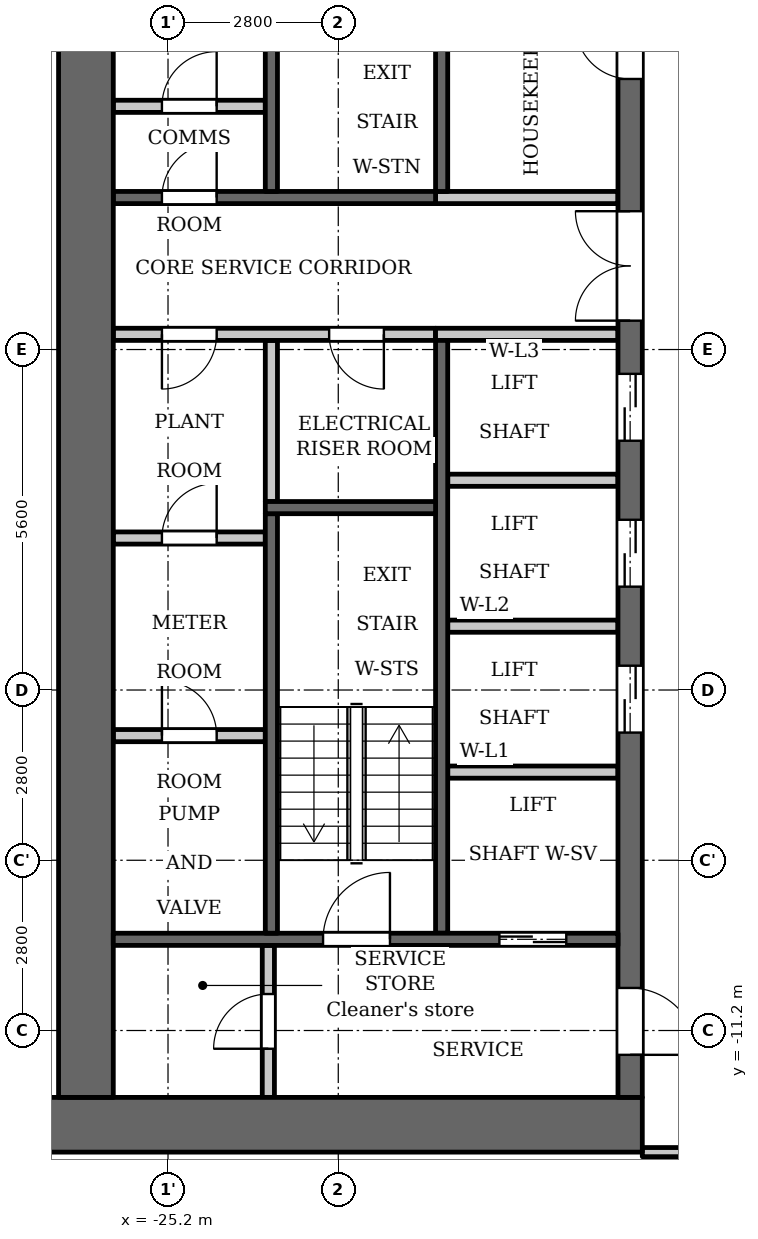
"""IFC4 building model, lengths in metres.
Left out: names, types, materials, properties, quantities, classifications, styles, units other than length and angle.
Written with IfcOpenShell. Run it as: python <this file> out.ifc"""

import sys

from ifc_helpers import new_model, si_unit, direction, frame, frame_2d, origin, place, context, subcontext, project, spatial, rectangle, extrude, element, fill, save


model = new_model("IFC4")
c1 = context("Model", 3, precision=1e-05, world=origin(), true_north=direction((0.0, 1.0)))
c2 = subcontext(c1, "Body", "Model", "MODEL_VIEW")
j1 = project(units=[si_unit("LENGTHUNIT", "METRE"), si_unit("PLANEANGLEUNIT", "RADIAN")], contexts=[c1])
p1 = place(None, origin())
s1 = spatial("IfcSite", under=j1, at=p1, CompositionType="ELEMENT")
p2 = place(p1, origin())
s2 = spatial("IfcBuilding", under=s1, at=p2, CompositionType="ELEMENT")
p3 = place(p2, frame((0.0, 0.0, 111.3)))
s3 = spatial("IfcBuildingStorey", under=s2, at=p3, CompositionType="ELEMENT", Elevation=111.3)
p4 = place(p3, frame((-23.5, -2.5, 0.0), z_axis=(0.0, 0.0, 1.0), x_axis=(0.0, 1.0, 0.0)))
e1 = element("IfcWall", 1, at=p4, inside=s3, PredefinedType="PARTITIONING", context=c2, shape_type="SweptSolid", body=[
    extrude(rectangle(XDim=2.65, YDim=0.2, at=frame_2d((1.325, 0.0))), origin(), (0.0, 0.0, 1.0), 3.2),
])
p5 = place(p3, frame((-20.7, 2.6, 0.0), z_axis=(0.0, 0.0, 1.0), x_axis=(0.0, 1.0, 0.0)))
e2 = element("IfcWall", 2, at=p5, inside=s3, PredefinedType="SHEAR", context=c2, shape_type="SweptSolid", body=[
    extrude(rectangle(XDim=7.0, YDim=0.2, at=frame_2d((3.5, 0.0))), origin(), (0.0, 0.0, 1.0), 3.2),
])
p6 = place(p3, frame((-20.7, -9.6, 0.0), z_axis=(0.0, 0.0, 1.0), x_axis=(0.0, 1.0, 0.0)))
e3 = element("IfcWall", 3, at=p6, inside=s3, PredefinedType="SHEAR", context=c2, shape_type="SweptSolid", body=[
    extrude(rectangle(XDim=9.75, YDim=0.2, at=frame_2d((4.875, 0.0))), origin(), (0.0, 0.0, 1.0), 3.2),
])
p7 = place(p3, frame((-20.8, 2.5, 0.0), z_axis=(0.0, 0.0, 1.0), x_axis=(-1.0, 0.0, 0.0)))
e4 = element("IfcWall", 4, at=p7, inside=s3, PredefinedType="SHEAR", context=c2, shape_type="SweptSolid", body=[
    extrude(rectangle(XDim=5.3, YDim=0.2, at=frame_2d((2.65, 0.0))), origin(), (0.0, 0.0, 1.0), 3.2),
])
p8 = place(p7, frame((3.6, 0.0, 0.0)))
e5 = element("IfcOpeningElement", 5, at=p8, cuts=e4, PredefinedType="OPENING", context=c2, shape_type="SweptSolid", body=[
    extrude(rectangle(XDim=0.9, YDim=2.1, at=frame_2d((0.45, 1.05))), frame((0.0, 0.11, 0.0), z_axis=(0.0, -1.0, 0.0), x_axis=(1.0, 0.0, 0.0)), (0.0, 0.0, 1.0), 0.22),
])
p9 = place(p3, frame((-20.8, 0.25, 0.0), z_axis=(0.0, 0.0, 1.0), x_axis=(-1.0, 0.0, 0.0)))
e6 = element("IfcWall", 6, at=p9, inside=s3, PredefinedType="PARTITIONING", context=c2, shape_type="SweptSolid", body=[
    extrude(rectangle(XDim=5.3, YDim=0.2, at=frame_2d((2.65, 0.0))), origin(), (0.0, 0.0, 1.0), 3.2),
])
p10 = place(p9, frame((0.85, 0.0, 0.0)))
e7 = element("IfcOpeningElement", 7, at=p10, cuts=e6, PredefinedType="OPENING", context=c2, shape_type="SweptSolid", body=[
    extrude(rectangle(XDim=0.9, YDim=2.1, at=frame_2d((0.45, 1.05))), frame((0.0, 0.11, 0.0), z_axis=(0.0, -1.0, 0.0), x_axis=(1.0, 0.0, 0.0)), (0.0, 0.0, 1.0), 0.22),
])
p11 = place(p9, frame((3.6, 0.0, 0.0)))
e8 = element("IfcOpeningElement", 8, at=p11, cuts=e6, PredefinedType="OPENING", context=c2, shape_type="SweptSolid", body=[
    extrude(rectangle(XDim=0.9, YDim=2.1, at=frame_2d((0.45, 1.05))), frame((0.0, 0.11, 0.0), z_axis=(0.0, -1.0, 0.0), x_axis=(1.0, 0.0, 0.0)), (0.0, 0.0, 1.0), 0.22),
])
p12 = place(p3, frame((-17.4, -12.75, 0.0), z_axis=(0.0, 0.0, 1.0), x_axis=(-1.0, 0.0, 0.0)))
e9 = element("IfcWall", 9, at=p12, inside=s3, PredefinedType="SHEAR", context=c2, shape_type="SweptSolid", body=[
    extrude(rectangle(XDim=10.4, YDim=0.9, at=frame_2d((5.2, 0.0))), origin(), (0.0, 0.0, 1.0), 3.2),
])
p13 = place(p3, frame((-17.6, -12.3, 0.0), z_axis=(0.0, 0.0, 1.0), x_axis=(0.0, 1.0, 0.0)))
e10 = element("IfcWall", 10, at=p13, inside=s3, PredefinedType="SHEAR", context=c2, shape_type="SweptSolid", body=[
    extrude(rectangle(XDim=24.6, YDim=0.4, at=frame_2d((12.3, 0.0))), origin(), (0.0, 0.0, 1.0), 3.2),
])
p14 = place(p13, frame((6.0, 0.0, 0.0)))
e11 = element("IfcOpeningElement", 11, at=p14, cuts=e10, PredefinedType="OPENING", context=c2, shape_type="SweptSolid", body=[
    extrude(rectangle(XDim=1.1, YDim=2.1, at=frame_2d((0.55, 1.05))), frame((0.0, 0.21, 0.0), z_axis=(0.0, -1.0, 0.0), x_axis=(1.0, 0.0, 0.0)), (0.0, 0.0, 1.0), 0.42),
])
p15 = place(p13, frame((8.4, 0.0, 0.0)))
e12 = element("IfcOpeningElement", 12, at=p15, cuts=e10, PredefinedType="OPENING", context=c2, shape_type="SweptSolid", body=[
    extrude(rectangle(XDim=1.1, YDim=2.1, at=frame_2d((0.55, 1.05))), frame((0.0, 0.21, 0.0), z_axis=(0.0, -1.0, 0.0), x_axis=(1.0, 0.0, 0.0)), (0.0, 0.0, 1.0), 0.42),
])
p16 = place(p13, frame((10.8, 0.0, 0.0)))
e13 = element("IfcOpeningElement", 13, at=p16, cuts=e10, PredefinedType="OPENING", context=c2, shape_type="SweptSolid", body=[
    extrude(rectangle(XDim=1.1, YDim=2.1, at=frame_2d((0.55, 1.05))), frame((0.0, 0.21, 0.0), z_axis=(0.0, -1.0, 0.0), x_axis=(1.0, 0.0, 0.0)), (0.0, 0.0, 1.0), 0.42),
])
p17 = place(p13, frame((16.75, 0.0, 0.0)))
e14 = element("IfcOpeningElement", 14, at=p17, cuts=e10, PredefinedType="OPENING", context=c2, shape_type="SweptSolid", body=[
    extrude(rectangle(XDim=0.9, YDim=2.1, at=frame_2d((0.45, 1.05))), frame((0.0, 0.21, 0.0), z_axis=(0.0, -1.0, 0.0), x_axis=(1.0, 0.0, 0.0)), (0.0, 0.0, 1.0), 0.42),
])
p18 = place(p13, frame((22.8, 0.0, 0.0)))
e15 = element("IfcOpeningElement", 15, at=p18, cuts=e10, PredefinedType="OPENING", context=c2, shape_type="SweptSolid", body=[
    extrude(rectangle(XDim=1.1, YDim=2.1, at=frame_2d((0.55, 1.05))), frame((0.0, 0.21, 0.0), z_axis=(0.0, -1.0, 0.0), x_axis=(1.0, 0.0, 0.0)), (0.0, 0.0, 1.0), 0.42),
])
p19 = place(p13, frame((0.7, 0.0, 0.0)))
e16 = element("IfcOpeningElement", 16, at=p19, cuts=e10, PredefinedType="OPENING", context=c2, shape_type="SweptSolid", body=[
    extrude(rectangle(XDim=1.1, YDim=2.1, at=frame_2d((0.55, 1.05))), frame((0.0, 0.21, 0.0), z_axis=(0.0, -1.0, 0.0), x_axis=(1.0, 0.0, 0.0)), (0.0, 0.0, 1.0), 0.42),
])
p20 = place(p13, frame((12.775, 0.0, 0.0)))
e17 = element("IfcOpeningElement", 17, at=p20, cuts=e10, PredefinedType="OPENING", context=c2, shape_type="SweptSolid", body=[
    extrude(rectangle(XDim=1.8, YDim=2.1, at=frame_2d((0.9, 1.05))), frame((0.0, 0.21, 0.0), z_axis=(0.0, -1.0, 0.0), x_axis=(1.0, 0.0, 0.0)), (0.0, 0.0, 1.0), 0.42),
])
p21 = place(p3, frame((-26.55, -12.3, 0.0), z_axis=(0.0, 0.0, 1.0), x_axis=(0.0, 1.0, 0.0)))
e18 = element("IfcWall", 18, at=p21, inside=s3, PredefinedType="SHEAR", context=c2, shape_type="SweptSolid", body=[
    extrude(rectangle(XDim=24.6, YDim=0.9, at=frame_2d((12.3, 0.0))), origin(), (0.0, 0.0, 1.0), 3.2),
])
p22 = place(p3, frame((-23.55, -12.3, 0.0), z_axis=(0.0, 0.0, 1.0), x_axis=(0.0, 1.0, 0.0)))
e19 = element("IfcWall", 19, at=p22, inside=s3, PredefinedType="PARTITIONING", context=c2, shape_type="SweptSolid", body=[
    extrude(rectangle(XDim=2.5, YDim=0.2, at=frame_2d((1.25, 0.0))), origin(), (0.0, 0.0, 1.0), 3.2),
])
p23 = place(p22, frame((0.8, 0.0, 0.0)))
e20 = element("IfcOpeningElement", 20, at=p23, cuts=e19, PredefinedType="OPENING", context=c2, shape_type="SweptSolid", body=[
    extrude(rectangle(XDim=0.9, YDim=2.1, at=frame_2d((0.45, 1.05))), frame((0.0, 0.11, 0.0), z_axis=(0.0, -1.0, 0.0), x_axis=(1.0, 0.0, 0.0)), (0.0, 0.0, 1.0), 0.22),
])
p24 = place(p3, frame((-23.6, -6.35, 0.0), z_axis=(0.0, 0.0, 1.0), x_axis=(-1.0, 0.0, 0.0)))
e21 = element("IfcWall", 21, at=p24, inside=s3, PredefinedType="PARTITIONING", context=c2, shape_type="SweptSolid", body=[
    extrude(rectangle(XDim=2.5, YDim=0.2, at=frame_2d((1.25, 0.0))), origin(), (0.0, 0.0, 1.0), 3.2),
])
p25 = place(p24, frame((0.8, 0.0, 0.0)))
e22 = element("IfcOpeningElement", 22, at=p25, cuts=e21, PredefinedType="OPENING", context=c2, shape_type="SweptSolid", body=[
    extrude(rectangle(XDim=0.9, YDim=2.1, at=frame_2d((0.45, 1.05))), frame((0.0, 0.11, 0.0), z_axis=(0.0, -1.0, 0.0), x_axis=(1.0, 0.0, 0.0)), (0.0, 0.0, 1.0), 0.22),
])
p26 = place(p3, frame((-23.6, -3.1, 0.0), z_axis=(0.0, 0.0, 1.0), x_axis=(-1.0, 0.0, 0.0)))
e23 = element("IfcWall", 23, at=p26, inside=s3, PredefinedType="PARTITIONING", context=c2, shape_type="SweptSolid", body=[
    extrude(rectangle(XDim=2.5, YDim=0.2, at=frame_2d((1.25, 0.0))), origin(), (0.0, 0.0, 1.0), 3.2),
])
p27 = place(p26, frame((0.8, 0.0, 0.0)))
e24 = element("IfcOpeningElement", 24, at=p27, cuts=e23, PredefinedType="OPENING", context=c2, shape_type="SweptSolid", body=[
    extrude(rectangle(XDim=0.9, YDim=2.1, at=frame_2d((0.45, 1.05))), frame((0.0, 0.11, 0.0), z_axis=(0.0, -1.0, 0.0), x_axis=(1.0, 0.0, 0.0)), (0.0, 0.0, 1.0), 0.22),
])
p28 = place(p3, frame((-23.6, 4.0, 0.0), z_axis=(0.0, 0.0, 1.0), x_axis=(-1.0, 0.0, 0.0)))
e25 = element("IfcWall", 25, at=p28, inside=s3, PredefinedType="PARTITIONING", context=c2, shape_type="SweptSolid", body=[
    extrude(rectangle(XDim=2.5, YDim=0.2, at=frame_2d((1.25, 0.0))), origin(), (0.0, 0.0, 1.0), 3.2),
])
p29 = place(p28, frame((0.8, 0.0, 0.0)))
e26 = element("IfcOpeningElement", 26, at=p29, cuts=e25, PredefinedType="OPENING", context=c2, shape_type="SweptSolid", body=[
    extrude(rectangle(XDim=0.9, YDim=2.1, at=frame_2d((0.45, 1.05))), frame((0.0, 0.11, 0.0), z_axis=(0.0, -1.0, 0.0), x_axis=(1.0, 0.0, 0.0)), (0.0, 0.0, 1.0), 0.22),
])
p30 = place(p3, frame((-17.8, -9.7, 0.0), z_axis=(0.0, 0.0, 1.0), x_axis=(-1.0, 0.0, 0.0)))
e27 = element("IfcWall", 27, at=p30, inside=s3, PredefinedType="SHEAR", context=c2, shape_type="SweptSolid", body=[
    extrude(rectangle(XDim=8.3, YDim=0.2, at=frame_2d((4.15, 0.0))), origin(), (0.0, 0.0, 1.0), 3.2),
])
p31 = place(p30, frame((0.85, 0.0, 0.0)))
e28 = element("IfcOpeningElement", 28, at=p31, cuts=e27, PredefinedType="OPENING", context=c2, shape_type="SweptSolid", body=[
    extrude(rectangle(XDim=1.1, YDim=2.1, at=frame_2d((0.55, 1.05))), frame((0.0, 0.11, 0.0), z_axis=(0.0, -1.0, 0.0), x_axis=(1.0, 0.0, 0.0)), (0.0, 0.0, 1.0), 0.22),
])
p32 = place(p30, frame((3.75, 0.0, 0.0)))
e29 = element("IfcOpeningElement", 29, at=p32, cuts=e27, PredefinedType="OPENING", context=c2, shape_type="SweptSolid", body=[
    extrude(rectangle(XDim=1.1, YDim=2.1, at=frame_2d((0.55, 1.05))), frame((0.0, 0.11, 0.0), z_axis=(0.0, -1.0, 0.0), x_axis=(1.0, 0.0, 0.0)), (0.0, 0.0, 1.0), 0.22),
])
for number, where, z_axis, x_axis in (
    (30, (-17.8, -6.95, 0.0), (0.0, 0.0, 1.0), (-1.0, 0.0, 0.0)),
    (31, (-17.8, -4.55, 0.0), (0.0, 0.0, 1.0), (-1.0, 0.0, 0.0)),
    (32, (-17.8, -2.15, 0.0), (0.0, 0.0, 1.0), (-1.0, 0.0, 0.0)),
):
    element("IfcWall", number, at=place(p3, frame(where, z_axis=z_axis, x_axis=x_axis)), inside=s3, PredefinedType="PARTITIONING", context=c2, shape_type="SweptSolid", body=[
        extrude(rectangle(XDim=2.8, YDim=0.2, at=frame_2d((1.4, 0.0))), origin(), (0.0, 0.0, 1.0), 3.2),
    ])
for number, where, z_axis, x_axis in (
    (33, (-17.8, 0.25, 0.0), (0.0, 0.0, 1.0), (-1.0, 0.0, 0.0)),
    (34, (-17.8, 2.5, 0.0), (0.0, 0.0, 1.0), (-1.0, 0.0, 0.0)),
):
    element("IfcWall", number, at=place(p3, frame(where, z_axis=z_axis, x_axis=x_axis)), inside=s3, PredefinedType="PARTITIONING", context=c2, shape_type="SweptSolid", body=[
        extrude(rectangle(XDim=3.0, YDim=0.2, at=frame_2d((1.5, 0.0))), origin(), (0.0, 0.0, 1.0), 3.2),
    ])
p33 = place(p3, frame((-23.5, 2.6, 0.0), z_axis=(0.0, 0.0, 1.0), x_axis=(0.0, 1.0, 0.0)))
e35 = element("IfcWall", 35, at=p33, inside=s3, PredefinedType="SHEAR", context=c2, shape_type="SweptSolid", body=[
    extrude(rectangle(XDim=7.0, YDim=0.2, at=frame_2d((3.5, 0.0))), origin(), (0.0, 0.0, 1.0), 3.2),
])
p34 = place(p3, frame((-23.5, -9.6, 0.0), z_axis=(0.0, 0.0, 1.0), x_axis=(0.0, 1.0, 0.0)))
e36 = element("IfcWall", 36, at=p34, inside=s3, PredefinedType="SHEAR", context=c2, shape_type="SweptSolid", body=[
    extrude(rectangle(XDim=6.9, YDim=0.2, at=frame_2d((3.45, 0.0))), origin(), (0.0, 0.0, 1.0), 3.2),
])
p35 = place(p3, frame((-20.8, -2.6, 0.0), z_axis=(0.0, 0.0, 1.0), x_axis=(-1.0, 0.0, 0.0)))
e37 = element("IfcWall", 37, at=p35, inside=s3, PredefinedType="SHEAR", context=c2, shape_type="SweptSolid", body=[
    extrude(rectangle(XDim=2.8, YDim=0.2, at=frame_2d((1.4, 0.0))), origin(), (0.0, 0.0, 1.0), 3.2),
])
p36 = place(p3, frame((-17.4, -13.2, 0.0), z_axis=(0.0, 0.0, 1.0), x_axis=(1.0, 0.0, 0.0)))
e38 = element("IfcWall", 38, at=p36, inside=s3, PredefinedType="PARTITIONING", context=c2, shape_type="SweptSolid", body=[
    extrude(rectangle(XDim=34.8, YDim=0.15, at=frame_2d((17.4, 0.0))), origin(), (0.0, 0.0, 1.0), 3.2),
])
p37 = place(p36, frame((0.65, 0.0, 0.0)))
e39 = element("IfcOpeningElement", 39, at=p37, cuts=e38, PredefinedType="OPENING", context=c2, shape_type="SweptSolid", body=[
    extrude(rectangle(XDim=1.0, YDim=2.1, at=frame_2d((0.5, 1.05))), frame((0.0, 0.085, 0.0), z_axis=(0.0, -1.0, 0.0), x_axis=(1.0, 0.0, 0.0)), (0.0, 0.0, 1.0), 0.17),
])
p38 = place(p36, frame((33.05, 0.0, 0.0)))
e40 = element("IfcOpeningElement", 40, at=p38, cuts=e38, PredefinedType="OPENING", context=c2, shape_type="SweptSolid", body=[
    extrude(rectangle(XDim=1.0, YDim=2.1, at=frame_2d((0.5, 1.05))), frame((0.0, 0.085, 0.0), z_axis=(0.0, -1.0, 0.0), x_axis=(1.0, 0.0, 0.0)), (0.0, 0.0, 1.0), 0.17),
])
p39 = place(p36, frame((4.55, 0.0, 0.0)))
e41 = element("IfcOpeningElement", 41, at=p39, cuts=e38, PredefinedType="OPENING", context=c2, shape_type="SweptSolid", body=[
    extrude(rectangle(XDim=1.0, YDim=2.1, at=frame_2d((0.5, 1.05))), frame((0.0, 0.085, 0.0), z_axis=(0.0, -1.0, 0.0), x_axis=(1.0, 0.0, 0.0)), (0.0, 0.0, 1.0), 0.17),
])
p40 = place(p36, frame((6.9, 0.0, 0.0)))
e42 = element("IfcOpeningElement", 42, at=p40, cuts=e38, PredefinedType="OPENING", context=c2, shape_type="SweptSolid", body=[
    extrude(rectangle(XDim=1.0, YDim=2.1, at=frame_2d((0.5, 1.05))), frame((0.0, 0.085, 0.0), z_axis=(0.0, -1.0, 0.0), x_axis=(1.0, 0.0, 0.0)), (0.0, 0.0, 1.0), 0.17),
])
p41 = place(p36, frame((15.75, 0.0, 0.0)))
e43 = element("IfcOpeningElement", 43, at=p41, cuts=e38, PredefinedType="OPENING", context=c2, shape_type="SweptSolid", body=[
    extrude(rectangle(XDim=1.0, YDim=2.1, at=frame_2d((0.5, 1.05))), frame((0.0, 0.085, 0.0), z_axis=(0.0, -1.0, 0.0), x_axis=(1.0, 0.0, 0.0)), (0.0, 0.0, 1.0), 0.17),
])
p42 = place(p36, frame((18.1, 0.0, 0.0)))
e44 = element("IfcOpeningElement", 44, at=p42, cuts=e38, PredefinedType="OPENING", context=c2, shape_type="SweptSolid", body=[
    extrude(rectangle(XDim=1.0, YDim=2.1, at=frame_2d((0.5, 1.05))), frame((0.0, 0.085, 0.0), z_axis=(0.0, -1.0, 0.0), x_axis=(1.0, 0.0, 0.0)), (0.0, 0.0, 1.0), 0.17),
])
p43 = place(p36, frame((26.95, 0.0, 0.0)))
e45 = element("IfcOpeningElement", 45, at=p43, cuts=e38, PredefinedType="OPENING", context=c2, shape_type="SweptSolid", body=[
    extrude(rectangle(XDim=1.0, YDim=2.1, at=frame_2d((0.5, 1.05))), frame((0.0, 0.085, 0.0), z_axis=(0.0, -1.0, 0.0), x_axis=(1.0, 0.0, 0.0)), (0.0, 0.0, 1.0), 0.17),
])
p44 = place(p36, frame((29.25, 0.0, 0.0)))
e46 = element("IfcOpeningElement", 46, at=p44, cuts=e38, PredefinedType="OPENING", context=c2, shape_type="SweptSolid", body=[
    extrude(rectangle(XDim=1.0, YDim=2.1, at=frame_2d((0.5, 1.05))), frame((0.0, 0.085, 0.0), z_axis=(0.0, -1.0, 0.0), x_axis=(1.0, 0.0, 0.0)), (0.0, 0.0, 1.0), 0.17),
])
p45 = place(p31, origin())
e47 = element("IfcDoor", 47, at=p45, inside=s3, OperationType="DOUBLE_DOOR_SLIDING", PredefinedType="DOOR", context=c2, shape_type="SweptSolid", body=[
    extrude(rectangle(XDim=1.1, YDim=2.1, at=frame_2d((0.55, 1.05))), frame((0.0, 0.025, 0.0), z_axis=(0.0, -1.0, 0.0), x_axis=(1.0, 0.0, 0.0)), (0.0, 0.0, 1.0), 0.05),
])
fill(e28, e47)
p46 = place(p14, origin())
e48 = element("IfcDoor", 48, at=p46, inside=s3, OperationType="DOUBLE_DOOR_SLIDING", PredefinedType="DOOR", context=c2, shape_type="SweptSolid", body=[
    extrude(rectangle(XDim=1.1, YDim=2.1, at=frame_2d((0.55, 1.05))), frame((0.0, 0.025, 0.0), z_axis=(0.0, -1.0, 0.0), x_axis=(1.0, 0.0, 0.0)), (0.0, 0.0, 1.0), 0.05),
])
fill(e11, e48)
p47 = place(p15, origin())
e49 = element("IfcDoor", 49, at=p47, inside=s3, OperationType="DOUBLE_DOOR_SLIDING", PredefinedType="DOOR", context=c2, shape_type="SweptSolid", body=[
    extrude(rectangle(XDim=1.1, YDim=2.1, at=frame_2d((0.55, 1.05))), frame((0.0, 0.025, 0.0), z_axis=(0.0, -1.0, 0.0), x_axis=(1.0, 0.0, 0.0)), (0.0, 0.0, 1.0), 0.05),
])
fill(e12, e49)
p48 = place(p16, origin())
e50 = element("IfcDoor", 50, at=p48, inside=s3, OperationType="DOUBLE_DOOR_SLIDING", PredefinedType="DOOR", context=c2, shape_type="SweptSolid", body=[
    extrude(rectangle(XDim=1.1, YDim=2.1, at=frame_2d((0.55, 1.05))), frame((0.0, 0.025, 0.0), z_axis=(0.0, -1.0, 0.0), x_axis=(1.0, 0.0, 0.0)), (0.0, 0.0, 1.0), 0.05),
])
fill(e13, e50)
p49 = place(p17, origin())
e51 = element("IfcDoor", 51, at=p49, inside=s3, OperationType="SINGLE_SWING_LEFT", PredefinedType="DOOR", context=c2, shape_type="SweptSolid", body=[
    extrude(rectangle(XDim=0.9, YDim=2.1, at=frame_2d((0.45, 1.05))), frame((0.0, 0.025, 0.0), z_axis=(0.0, -1.0, 0.0), x_axis=(1.0, 0.0, 0.0)), (0.0, 0.0, 1.0), 0.05),
])
fill(e14, e51)
p50 = place(p19, origin())
e52 = element("IfcDoor", 52, at=p50, inside=s3, OperationType="SINGLE_SWING_LEFT", PredefinedType="DOOR", context=c2, shape_type="SweptSolid", body=[
    extrude(rectangle(XDim=1.1, YDim=2.1, at=frame_2d((0.55, 1.05))), frame((0.0, 0.025, 0.0), z_axis=(0.0, -1.0, 0.0), x_axis=(1.0, 0.0, 0.0)), (0.0, 0.0, 1.0), 0.05),
])
fill(e16, e52)
p51 = place(p23, origin())
e53 = element("IfcDoor", 53, at=p51, inside=s3, OperationType="SINGLE_SWING_RIGHT", PredefinedType="DOOR", context=c2, shape_type="SweptSolid", body=[
    extrude(rectangle(XDim=0.9, YDim=2.1, at=frame_2d((0.45, 1.05))), frame((0.0, 0.025, 0.0), z_axis=(0.0, -1.0, 0.0), x_axis=(1.0, 0.0, 0.0)), (0.0, 0.0, 1.0), 0.05),
])
fill(e20, e53)
p52 = place(p32, origin())
e54 = element("IfcDoor", 54, at=p52, inside=s3, OperationType="SINGLE_SWING_LEFT", PredefinedType="DOOR", context=c2, shape_type="SweptSolid", body=[
    extrude(rectangle(XDim=1.1, YDim=2.1, at=frame_2d((0.55, 1.05))), frame((0.0, 0.025, 0.0), z_axis=(0.0, -1.0, 0.0), x_axis=(1.0, 0.0, 0.0)), (0.0, 0.0, 1.0), 0.05),
])
fill(e29, e54)
p53 = place(p20, origin())
e55 = element("IfcDoor", 55, at=p53, inside=s3, OperationType="DOUBLE_DOOR_SINGLE_SWING", PredefinedType="DOOR", context=c2, shape_type="SweptSolid", body=[
    extrude(rectangle(XDim=1.8, YDim=2.1, at=frame_2d((0.9, 1.05))), frame((0.0, 0.025, 0.0), z_axis=(0.0, -1.0, 0.0), x_axis=(1.0, 0.0, 0.0)), (0.0, 0.0, 1.0), 0.05),
])
fill(e17, e55)
p54 = place(p10, origin())
e56 = element("IfcDoor", 56, at=p54, inside=s3, OperationType="SINGLE_SWING_RIGHT", PredefinedType="DOOR", context=c2, shape_type="SweptSolid", body=[
    extrude(rectangle(XDim=0.9, YDim=2.1, at=frame_2d((0.45, 1.05))), frame((0.0, 0.025, 0.0), z_axis=(0.0, -1.0, 0.0), x_axis=(1.0, 0.0, 0.0)), (0.0, 0.0, 1.0), 0.05),
])
fill(e7, e56)
p55 = place(p25, origin())
e57 = element("IfcDoor", 57, at=p55, inside=s3, OperationType="SINGLE_SWING_RIGHT", PredefinedType="DOOR", context=c2, shape_type="SweptSolid", body=[
    extrude(rectangle(XDim=0.9, YDim=2.1, at=frame_2d((0.45, 1.05))), frame((0.0, 0.025, 0.0), z_axis=(0.0, -1.0, 0.0), x_axis=(1.0, 0.0, 0.0)), (0.0, 0.0, 1.0), 0.05),
])
fill(e22, e57)
p56 = place(p27, origin())
e58 = element("IfcDoor", 58, at=p56, inside=s3, OperationType="SINGLE_SWING_LEFT", PredefinedType="DOOR", context=c2, shape_type="SweptSolid", body=[
    extrude(rectangle(XDim=0.9, YDim=2.1, at=frame_2d((0.45, 1.05))), frame((0.0, 0.025, 0.0), z_axis=(0.0, -1.0, 0.0), x_axis=(1.0, 0.0, 0.0)), (0.0, 0.0, 1.0), 0.05),
])
fill(e24, e58)
p57 = place(p11, origin())
e59 = element("IfcDoor", 59, at=p57, inside=s3, OperationType="SINGLE_SWING_LEFT", PredefinedType="DOOR", context=c2, shape_type="SweptSolid", body=[
    extrude(rectangle(XDim=0.9, YDim=2.1, at=frame_2d((0.45, 1.05))), frame((0.0, 0.025, 0.0), z_axis=(0.0, -1.0, 0.0), x_axis=(1.0, 0.0, 0.0)), (0.0, 0.0, 1.0), 0.05),
])
fill(e8, e59)
p58 = place(p29, origin())
e60 = element("IfcDoor", 60, at=p58, inside=s3, OperationType="SINGLE_SWING_LEFT", PredefinedType="DOOR", context=c2, shape_type="SweptSolid", body=[
    extrude(rectangle(XDim=0.9, YDim=2.1, at=frame_2d((0.45, 1.05))), frame((0.0, 0.025, 0.0), z_axis=(0.0, -1.0, 0.0), x_axis=(1.0, 0.0, 0.0)), (0.0, 0.0, 1.0), 0.05),
])
fill(e26, e60)
p59 = place(p8, origin())
e61 = element("IfcDoor", 61, at=p59, inside=s3, OperationType="SINGLE_SWING_LEFT", PredefinedType="DOOR", context=c2, shape_type="SweptSolid", body=[
    extrude(rectangle(XDim=0.9, YDim=2.1, at=frame_2d((0.45, 1.05))), frame((0.0, 0.025, 0.0), z_axis=(0.0, -1.0, 0.0), x_axis=(1.0, 0.0, 0.0)), (0.0, 0.0, 1.0), 0.05),
])
fill(e5, e61)
save(model, sys.argv[1])
